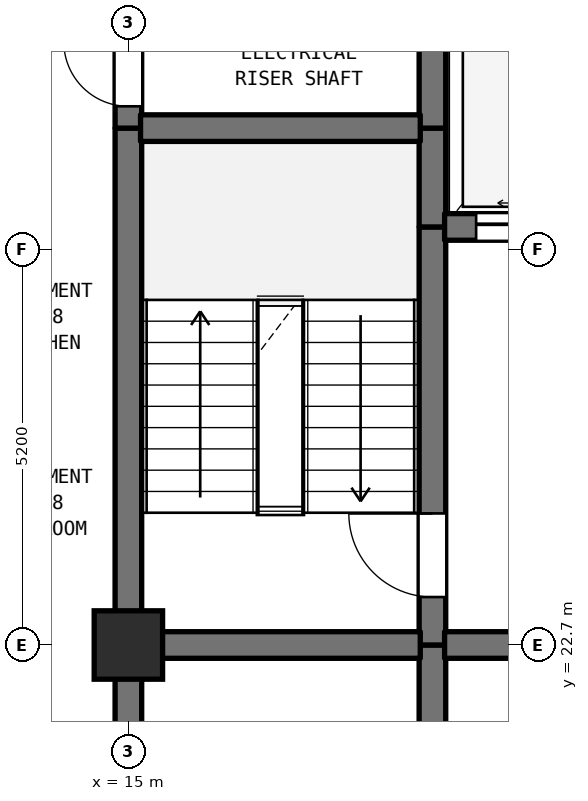
"""IFC4 building model, lengths in metres.
Left out: names, types, materials, properties, quantities, classifications, styles, units other than length and angle.
Written with IfcOpenShell. Run it as: python <this file> out.ifc"""

import sys

from ifc_helpers import new_model, si_unit, direction, frame, frame_2d, origin, origin_2d, place, context, subcontext, project, spatial, rectangle, extrude, element, fill, save


model = new_model("IFC4")
c1 = context("Model", 3, precision=1e-05, world=origin(), true_north=direction((0.0, 1.0)))
c2 = subcontext(c1, "Body", "Model", "MODEL_VIEW")
j1 = project(units=[si_unit("LENGTHUNIT", "METRE"), si_unit("PLANEANGLEUNIT", "RADIAN")], contexts=[c1])
p1 = place(None, origin())
s1 = spatial("IfcSite", under=j1, at=p1, CompositionType="ELEMENT")
p2 = place(p1, origin())
s2 = spatial("IfcBuilding", under=s1, at=p2, CompositionType="ELEMENT")
p3 = place(p2, frame((0.0, 0.0, 155.7)))
s3 = spatial("IfcBuildingStorey", under=s2, at=p3, CompositionType="ELEMENT", Elevation=155.7)
p4 = place(p3, frame((15.0, 22.7, 0.0), z_axis=(0.0, 0.0, 1.0), x_axis=(1.0, 0.0, 0.0)))
e1 = element("IfcColumn", 1, at=p4, inside=s3, PredefinedType="COLUMN", context=c2, shape_type="SweptSolid", body=[
    extrude(rectangle(XDim=0.9, YDim=0.9, at=origin_2d()), origin(), (0.0, 0.0, 1.0), 3.7),
])
p5 = place(p3, frame((15.0, 19.5, 0.0), z_axis=(0.0, 0.0, 1.0), x_axis=(0.0, 1.0, 0.0)))
e2 = element("IfcWall", 2, at=p5, inside=s3, PredefinedType="SHEAR", context=c2, shape_type="SweptSolid", body=[
    extrude(rectangle(XDim=3.2, YDim=0.35, at=frame_2d((1.6, 0.0))), origin(), (0.0, 0.0, 1.0), 3.28),
])
p6 = place(p3, frame((15.0, 22.7, 0.0), z_axis=(0.0, 0.0, 1.0), x_axis=(0.0, 1.0, 0.0)))
e3 = element("IfcWall", 3, at=p6, inside=s3, PredefinedType="SHEAR", context=c2, shape_type="SweptSolid", body=[
    extrude(rectangle(XDim=6.8, YDim=0.35, at=frame_2d((3.4, 0.0))), origin(), (0.0, 0.0, 1.0), 3.28),
])
p7 = place(p3, frame((15.0, 29.5, 0.0), z_axis=(0.0, 0.0, 1.0), x_axis=(0.0, 1.0, 0.0)))
e4 = element("IfcWall", 4, at=p7, inside=s3, PredefinedType="SHEAR", context=c2, shape_type="SweptSolid", body=[
    extrude(rectangle(XDim=1.6, YDim=0.35, at=frame_2d((0.8, 0.0))), origin(), (0.0, 0.0, 1.0), 3.28),
])
p8 = place(p7, frame((0.287, 0.0, 0.0)))
e5 = element("IfcOpeningElement", 5, at=p8, cuts=e4, PredefinedType="OPENING", context=c2, shape_type="SweptSolid", body=[
    extrude(rectangle(XDim=0.85, YDim=2.1, at=frame_2d((0.425, 1.05))), frame((0.0, 0.185, 0.0), z_axis=(0.0, -1.0, 0.0), x_axis=(1.0, 0.0, 0.0)), (0.0, 0.0, 1.0), 0.37),
])
p9 = place(p3, frame((19.0, 19.5, 0.0), z_axis=(0.0, 0.0, 1.0), x_axis=(0.0, 1.0, 0.0)))
e6 = element("IfcWall", 6, at=p9, inside=s3, PredefinedType="SHEAR", context=c2, shape_type="SweptSolid", body=[
    extrude(rectangle(XDim=3.2, YDim=0.35, at=frame_2d((1.6, 0.0))), origin(), (0.0, 0.0, 1.0), 3.28),
])
p10 = place(p3, frame((19.0, 22.7, 0.0), z_axis=(0.0, 0.0, 1.0), x_axis=(0.0, 1.0, 0.0)))
e7 = element("IfcWall", 7, at=p10, inside=s3, PredefinedType="SHEAR", context=c2, shape_type="SweptSolid", body=[
    extrude(rectangle(XDim=5.5, YDim=0.35, at=frame_2d((2.75, 0.0))), origin(), (0.0, 0.0, 1.0), 3.28),
])
p11 = place(p10, frame((0.631, 0.0, 0.0)))
e8 = element("IfcOpeningElement", 8, at=p11, cuts=e7, PredefinedType="OPENING", context=c2, shape_type="SweptSolid", body=[
    extrude(rectangle(XDim=1.1, YDim=2.15, at=frame_2d((0.55, 1.075))), frame((0.0, 0.185, 0.0), z_axis=(0.0, -1.0, 0.0), x_axis=(1.0, 0.0, 0.0)), (0.0, 0.0, 1.0), 0.37),
])
p12 = place(p3, frame((19.0, 28.2, 0.0), z_axis=(0.0, 0.0, 1.0), x_axis=(0.0, 1.0, 0.0)))
e9 = element("IfcWall", 9, at=p12, inside=s3, PredefinedType="SHEAR", context=c2, shape_type="SweptSolid", body=[
    extrude(rectangle(XDim=1.3, YDim=0.35, at=frame_2d((0.65, 0.0))), origin(), (0.0, 0.0, 1.0), 3.28),
])
p13 = place(p3, frame((19.0, 29.5, 0.0), z_axis=(0.0, 0.0, 1.0), x_axis=(0.0, 1.0, 0.0)))
e10 = element("IfcWall", 10, at=p13, inside=s3, PredefinedType="SHEAR", context=c2, shape_type="SweptSolid", body=[
    extrude(rectangle(XDim=5.5, YDim=0.35, at=frame_2d((2.75, 0.0))), origin(), (0.0, 0.0, 1.0), 3.28),
])
p14 = place(p13, frame((2.025, 0.0, 0.0)))
e11 = element("IfcOpeningElement", 11, at=p14, cuts=e10, PredefinedType="OPENING", context=c2, shape_type="SweptSolid", body=[
    extrude(rectangle(XDim=1.1, YDim=2.15, at=frame_2d((0.55, 1.075))), frame((0.0, 0.185, 0.0), z_axis=(0.0, -1.0, 0.0), x_axis=(1.0, 0.0, 0.0)), (0.0, 0.0, 1.0), 0.37),
])
p15 = place(p3, frame((15.16, 22.7, 0.0), z_axis=(0.0, 0.0, 1.0), x_axis=(1.0, 0.0, 0.0)))
e12 = element("IfcWall", 12, at=p15, inside=s3, PredefinedType="SHEAR", context=c2, shape_type="SweptSolid", body=[
    extrude(rectangle(XDim=3.68, YDim=0.35, at=frame_2d((1.84, 0.0))), origin(), (0.0, 0.0, 1.0), 3.28),
])
p16 = place(p3, frame((19.16, 22.7, 0.0), z_axis=(0.0, 0.0, 1.0), x_axis=(1.0, 0.0, 0.0)))
e13 = element("IfcWall", 13, at=p16, inside=s3, PredefinedType="SHEAR", context=c2, shape_type="SweptSolid", body=[
    extrude(rectangle(XDim=4.48, YDim=0.35, at=frame_2d((2.24, 0.0))), origin(), (0.0, 0.0, 1.0), 3.28),
])
p17 = place(p16, frame((1.64, 0.0, 0.0)))
e14 = element("IfcOpeningElement", 14, at=p17, cuts=e13, PredefinedType="OPENING", context=c2, shape_type="SweptSolid", body=[
    extrude(rectangle(XDim=1.2, YDim=2.2, at=frame_2d((0.6, 1.1))), frame((0.0, 0.185, 0.0), z_axis=(0.0, -1.0, 0.0), x_axis=(1.0, 0.0, 0.0)), (0.0, 0.0, 1.0), 0.37),
])
p18 = place(p3, frame((19.16, 28.2, 0.0), z_axis=(0.0, 0.0, 1.0), x_axis=(1.0, 0.0, 0.0)))
e15 = element("IfcWall", 15, at=p18, inside=s3, PredefinedType="SHEAR", context=c2, shape_type="SweptSolid", body=[
    extrude(rectangle(XDim=4.48, YDim=0.35, at=frame_2d((2.24, 0.0))), origin(), (0.0, 0.0, 1.0), 3.28),
])
p19 = place(p18, frame((0.415, 0.0, 0.0)))
e16 = element("IfcOpeningElement", 16, at=p19, cuts=e15, PredefinedType="OPENING", context=c2, shape_type="SweptSolid", body=[
    extrude(rectangle(XDim=1.25, YDim=2.2, at=frame_2d((0.625, 1.1))), frame((0.0, 0.185, 0.0), z_axis=(0.0, -1.0, 0.0), x_axis=(1.0, 0.0, 0.0)), (0.0, 0.0, 1.0), 0.37),
])
p20 = place(p18, frame((2.815, 0.0, 0.0)))
e17 = element("IfcOpeningElement", 17, at=p20, cuts=e15, PredefinedType="OPENING", context=c2, shape_type="SweptSolid", body=[
    extrude(rectangle(XDim=1.25, YDim=2.2, at=frame_2d((0.625, 1.1))), frame((0.0, 0.185, 0.0), z_axis=(0.0, -1.0, 0.0), x_axis=(1.0, 0.0, 0.0)), (0.0, 0.0, 1.0), 0.37),
])
p21 = place(p3, frame((15.16, 29.5, 0.0), z_axis=(0.0, 0.0, 1.0), x_axis=(1.0, 0.0, 0.0)))
e18 = element("IfcWall", 18, at=p21, inside=s3, PredefinedType="SHEAR", context=c2, shape_type="SweptSolid", body=[
    extrude(rectangle(XDim=3.68, YDim=0.35, at=frame_2d((1.84, 0.0))), origin(), (0.0, 0.0, 1.0), 3.28),
])
p22 = place(p8, origin())
e19 = element("IfcDoor", 19, at=p22, inside=s3, OperationType="SINGLE_SWING_RIGHT", PredefinedType="DOOR", context=c2, shape_type="SweptSolid", body=[
    extrude(rectangle(XDim=0.85, YDim=2.1, at=frame_2d((0.425, 1.05))), frame((0.0, 0.025, 0.0), z_axis=(0.0, -1.0, 0.0), x_axis=(1.0, 0.0, 0.0)), (0.0, 0.0, 1.0), 0.05),
])
fill(e5, e19)
p23 = place(p11, origin())
e20 = element("IfcDoor", 20, at=p23, inside=s3, OperationType="SINGLE_SWING_RIGHT", PredefinedType="DOOR", context=c2, shape_type="SweptSolid", body=[
    extrude(rectangle(XDim=1.1, YDim=2.15, at=frame_2d((0.55, 1.075))), frame((0.0, 0.025, 0.0), z_axis=(0.0, -1.0, 0.0), x_axis=(1.0, 0.0, 0.0)), (0.0, 0.0, 1.0), 0.05),
])
fill(e8, e20)
p24 = place(p19, origin())
e21 = element("IfcDoor", 21, at=p24, inside=s3, OperationType="DOUBLE_DOOR_SLIDING", PredefinedType="DOOR", context=c2, shape_type="SweptSolid", body=[
    extrude(rectangle(XDim=1.25, YDim=2.2, at=frame_2d((0.625, 1.1))), frame((0.0, 0.025, 0.0), z_axis=(0.0, -1.0, 0.0), x_axis=(1.0, 0.0, 0.0)), (0.0, 0.0, 1.0), 0.05),
])
fill(e16, e21)
save(model, sys.argv[1])
